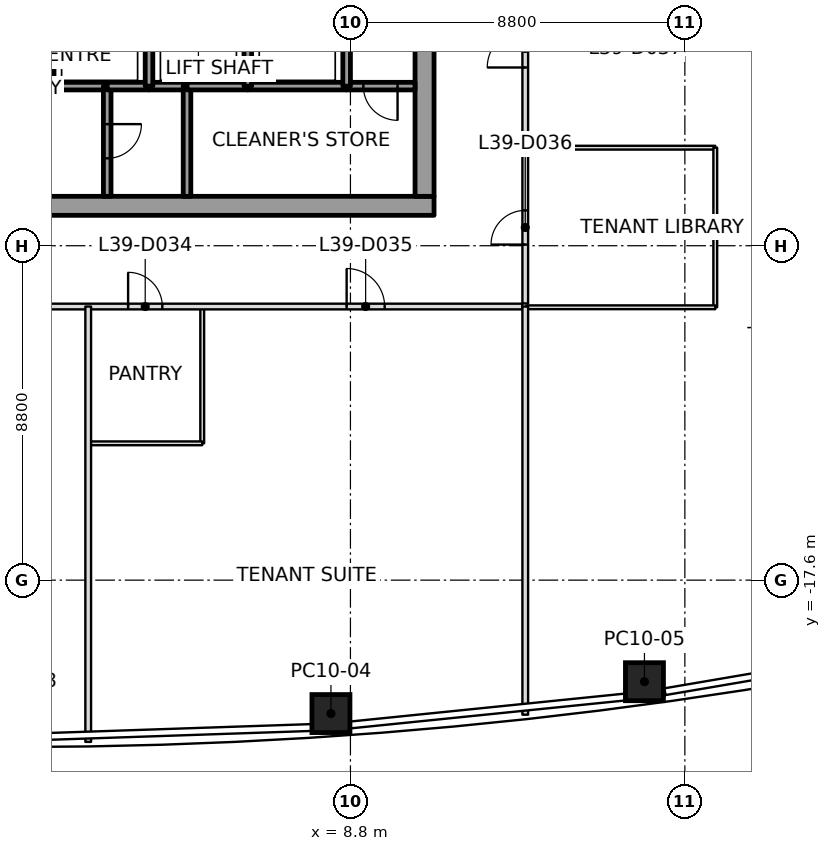
"""IFC4 building model, lengths in metres.
Left out: names, types, materials, properties, quantities, classifications, styles, units other than length and angle.
Written with IfcOpenShell. Run it as: python <this file> out.ifc"""

import sys

from ifc_helpers import new_model, si_unit, direction, frame, frame_2d, origin, origin_2d, place, context, subcontext, project, spatial, rectangle, extrude, element, fill, save


model = new_model("IFC4")
c1 = context("Model", 3, precision=1e-05, world=origin(), true_north=direction((0.0, 1.0)))
c2 = subcontext(c1, "Body", "Model", "MODEL_VIEW")
j1 = project(units=[si_unit("LENGTHUNIT", "METRE"), si_unit("PLANEANGLEUNIT", "RADIAN")], contexts=[c1])
p1 = place(None, origin())
s1 = spatial("IfcSite", under=j1, at=p1, CompositionType="ELEMENT")
p2 = place(p1, origin())
s2 = spatial("IfcBuilding", under=s1, at=p2, CompositionType="ELEMENT")
p3 = place(p2, frame((0.0, 0.0, 177.8)))
s3 = spatial("IfcBuildingStorey", under=s2, at=p3, CompositionType="ELEMENT", Elevation=177.8)
p4 = place(p3, frame((8.287, -21.111, 0.0), z_axis=(-0.008849199152, 0.01116829962, 0.999898475225), x_axis=(0.99768068915, 0.067587294423, 0.008074659732)))
e1 = element("IfcColumn", 1, at=p4, inside=s3, PredefinedType="COLUMN", context=c2, shape_type="SweptSolid", body=[
    extrude(rectangle(XDim=1.0, YDim=1.0, at=origin_2d()), origin(), (0.0, 0.0, 1.0), 4.0),
])
p5 = place(p3, frame((16.536, -20.273, 0.0), z_axis=(-0.017635456472, 0.010434820265, 0.999790030557), x_axis=(0.990735318315, 0.134853029404, 0.016068276304)))
e2 = element("IfcColumn", 2, at=p5, inside=s3, PredefinedType="COLUMN", context=c2, shape_type="SweptSolid", body=[
    extrude(rectangle(XDim=1.0, YDim=1.0, at=origin_2d()), origin(), (0.0, 0.0, 1.0), 4.001),
])
p6 = place(p3, frame((-11.0, -7.75, 0.0), z_axis=(0.0, 0.0, 1.0), x_axis=(1.0, 0.0, 0.0)))
e3 = element("IfcWall", 3, at=p6, inside=s3, PredefinedType="SHEAR", context=c2, shape_type="SweptSolid", body=[
    extrude(rectangle(XDim=22.0, YDim=0.5, at=frame_2d((11.0, 0.0))), origin(), (0.0, 0.0, 1.0), 4.0),
])
p7 = place(p6, frame((10.45, 0.0, 0.0)))
e4 = element("IfcOpeningElement", 4, at=p7, cuts=e3, PredefinedType="OPENING", context=c2, shape_type="SweptSolid", body=[
    extrude(rectangle(XDim=1.1, YDim=2.1, at=frame_2d((0.55, 1.05))), frame((0.0, 0.25, 0.0), z_axis=(0.0, -1.0, 0.0), x_axis=(1.0, 0.0, 0.0)), (0.0, 0.0, 1.0), 0.5),
])
p8 = place(p3, frame((10.75, -7.5, 0.0), z_axis=(0.0, 0.0, 1.0), x_axis=(0.0, 1.0, 0.0)))
e5 = element("IfcWall", 5, at=p8, inside=s3, PredefinedType="SHEAR", context=c2, shape_type="SweptSolid", body=[
    extrude(rectangle(XDim=15.0, YDim=0.5, at=frame_2d((7.5, 0.0))), origin(), (0.0, 0.0, 1.0), 4.0),
])
p9 = place(p8, frame((6.6, 0.0, 0.0)))
e6 = element("IfcOpeningElement", 6, at=p9, cuts=e5, PredefinedType="OPENING", context=c2, shape_type="SweptSolid", body=[
    extrude(rectangle(XDim=1.8, YDim=2.1, at=frame_2d((0.9, 1.05))), frame((0.0, 0.25, 0.0), z_axis=(0.0, -1.0, 0.0), x_axis=(1.0, 0.0, 0.0)), (0.0, 0.0, 1.0), 0.5),
])
p10 = place(p3, frame((0.9, -1.8, 0.0), z_axis=(0.0, 0.0, 1.0), x_axis=(0.0, -1.0, 0.0)))
e7 = element("IfcWall", 7, at=p10, inside=s3, PredefinedType="SOLIDWALL", context=c2, shape_type="SweptSolid", body=[
    extrude(rectangle(XDim=2.8, YDim=0.2, at=frame_2d((1.4, 0.0))), origin(), (0.0, 0.0, 1.0), 3.85),
])
p11 = place(p3, frame((0.9, -4.6, 0.0), z_axis=(0.0, 0.0, 1.0), x_axis=(1.0, 0.0, 0.0)))
e8 = element("IfcWall", 8, at=p11, inside=s3, PredefinedType="SOLIDWALL", context=c2, shape_type="SweptSolid", body=[
    extrude(rectangle(XDim=1.5, YDim=0.2, at=frame_2d((0.75, 0.0))), origin(), (0.0, 0.0, 1.0), 3.85),
])
p12 = place(p3, frame((2.4, -4.6, 0.0), z_axis=(0.0, 0.0, 1.0), x_axis=(0.0, -1.0, 0.0)))
e9 = element("IfcWall", 9, at=p12, inside=s3, PredefinedType="SOLIDWALL", context=c2, shape_type="SweptSolid", body=[
    extrude(rectangle(XDim=2.9, YDim=0.2, at=frame_2d((1.45, 0.0))), origin(), (0.0, 0.0, 1.0), 3.85),
])
p13 = place(p12, frame((1.0, 0.0, 0.0)))
e10 = element("IfcOpeningElement", 10, at=p13, cuts=e9, PredefinedType="OPENING", context=c2, shape_type="SweptSolid", body=[
    extrude(rectangle(XDim=0.9, YDim=2.1, at=frame_2d((0.45, 1.05))), frame((0.0, 0.1, 0.0), z_axis=(0.0, -1.0, 0.0), x_axis=(1.0, 0.0, 0.0)), (0.0, 0.0, 1.0), 0.2),
])
p14 = place(p3, frame((3.5, -4.6, 0.0), z_axis=(0.0, 0.0, 1.0), x_axis=(-1.0, 0.0, 0.0)))
e11 = element("IfcWall", 11, at=p14, inside=s3, PredefinedType="SOLIDWALL", context=c2, shape_type="SweptSolid", body=[
    extrude(rectangle(XDim=1.1, YDim=0.2, at=frame_2d((0.55, 0.0))), origin(), (0.0, 0.0, 1.0), 3.85),
])
p15 = place(p3, frame((4.5, -4.6, 0.0), z_axis=(0.0, 0.0, 1.0), x_axis=(-1.0, 0.0, 0.0)))
e12 = element("IfcWall", 12, at=p15, inside=s3, PredefinedType="SOLIDWALL", context=c2, shape_type="SweptSolid", body=[
    extrude(rectangle(XDim=1.0, YDim=0.2, at=frame_2d((0.5, 0.0))), origin(), (0.0, 0.0, 1.0), 3.85),
])
p16 = place(p3, frame((3.5, -4.6, 0.0), z_axis=(0.0, 0.0, 1.0), x_axis=(0.0, 1.0, 0.0)))
e13 = element("IfcWall", 13, at=p16, inside=s3, PredefinedType="SOLIDWALL", context=c2, shape_type="SweptSolid", body=[
    extrude(rectangle(XDim=2.8, YDim=0.2, at=frame_2d((1.4, 0.0))), origin(), (0.0, 0.0, 1.0), 3.85),
])
p17 = place(p3, frame((4.5, -4.6, 0.0), z_axis=(0.0, 0.0, 1.0), x_axis=(0.0, -1.0, 0.0)))
e14 = element("IfcWall", 14, at=p17, inside=s3, PredefinedType="SOLIDWALL", context=c2, shape_type="SweptSolid", body=[
    extrude(rectangle(XDim=2.9, YDim=0.2, at=frame_2d((1.45, 0.0))), origin(), (0.0, 0.0, 1.0), 3.85),
])
p18 = place(p3, frame((6.1, -4.6, 0.0), z_axis=(0.0, 0.0, 1.0), x_axis=(-1.0, 0.0, 0.0)))
e15 = element("IfcWall", 15, at=p18, inside=s3, PredefinedType="SOLIDWALL", context=c2, shape_type="SweptSolid", body=[
    extrude(rectangle(XDim=1.6, YDim=0.2, at=frame_2d((0.8, 0.0))), origin(), (0.0, 0.0, 1.0), 3.85),
])
p19 = place(p3, frame((8.7, -4.6, 0.0), z_axis=(0.0, 0.0, 1.0), x_axis=(-1.0, 0.0, 0.0)))
e16 = element("IfcWall", 16, at=p19, inside=s3, PredefinedType="SOLIDWALL", context=c2, shape_type="SweptSolid", body=[
    extrude(rectangle(XDim=2.6, YDim=0.2, at=frame_2d((1.3, 0.0))), origin(), (0.0, 0.0, 1.0), 3.85),
])
p20 = place(p3, frame((6.1, -4.6, 0.0), z_axis=(0.0, 0.0, 1.0), x_axis=(0.0, 1.0, 0.0)))
e17 = element("IfcWall", 17, at=p20, inside=s3, PredefinedType="SOLIDWALL", context=c2, shape_type="SweptSolid", body=[
    extrude(rectangle(XDim=2.8, YDim=0.2, at=frame_2d((1.4, 0.0))), origin(), (0.0, 0.0, 1.0), 3.85),
])
p21 = place(p3, frame((10.5, -4.6, 0.0), z_axis=(0.0, 0.0, 1.0), x_axis=(-1.0, 0.0, 0.0)))
e18 = element("IfcWall", 18, at=p21, inside=s3, PredefinedType="SOLIDWALL", context=c2, shape_type="SweptSolid", body=[
    extrude(rectangle(XDim=1.8, YDim=0.2, at=frame_2d((0.9, 0.0))), origin(), (0.0, 0.0, 1.0), 3.85),
])
p22 = place(p21, frame((0.46, 0.0, 0.0)))
e19 = element("IfcOpeningElement", 19, at=p22, cuts=e18, PredefinedType="OPENING", context=c2, shape_type="SweptSolid", body=[
    extrude(rectangle(XDim=0.9, YDim=2.1, at=frame_2d((0.45, 1.05))), frame((0.0, 0.1, 0.0), z_axis=(0.0, -1.0, 0.0), x_axis=(1.0, 0.0, 0.0)), (0.0, 0.0, 1.0), 0.2),
])
p23 = place(p3, frame((8.7, -1.8, 0.0), z_axis=(0.0, 0.0, 1.0), x_axis=(0.0, -1.0, 0.0)))
e20 = element("IfcWall", 20, at=p23, inside=s3, PredefinedType="SOLIDWALL", context=c2, shape_type="SweptSolid", body=[
    extrude(rectangle(XDim=2.8, YDim=0.2, at=frame_2d((1.4, 0.0))), origin(), (0.0, 0.0, 1.0), 3.85),
])
p24 = place(p3, frame((1.9, -10.4, 0.0), z_axis=(0.0, 0.0, 1.0), x_axis=(0.0, -1.0, 0.0)))
e21 = element("IfcWall", 21, at=p24, inside=s3, PredefinedType="PARTITIONING", context=c2, shape_type="SweptSolid", body=[
    extrude(rectangle(XDim=11.457, YDim=0.15, at=frame_2d((5.729, 0.0))), origin(), (0.0, 0.0, 1.0), 3.234),
])
p25 = place(p3, frame((13.4, -10.4, 0.0), z_axis=(0.0, 0.0, 1.0), x_axis=(0.0, -1.0, 0.0)))
e22 = element("IfcWall", 22, at=p25, inside=s3, PredefinedType="PARTITIONING", context=c2, shape_type="SweptSolid", body=[
    extrude(rectangle(XDim=10.741, YDim=0.15, at=frame_2d((5.37, 0.0))), origin(), (0.0, 0.0, 1.0), 3.234),
])
p26 = place(p3, frame((-13.32, -10.4, 0.0), z_axis=(0.0, 0.0, 1.0), x_axis=(1.0, 0.0, 0.0)))
e23 = element("IfcWall", 23, at=p26, inside=s3, PredefinedType="PARTITIONING", context=c2, shape_type="SweptSolid", body=[
    extrude(rectangle(XDim=26.64, YDim=0.15, at=frame_2d((13.32, 0.0))), origin(), (0.0, 0.0, 1.0), 3.317),
])
p27 = place(p26, frame((0.97, 0.0, 0.0)))
e24 = element("IfcOpeningElement", 24, at=p27, cuts=e23, PredefinedType="OPENING", context=c2, shape_type="SweptSolid", body=[
    extrude(rectangle(XDim=0.9, YDim=2.1, at=frame_2d((0.45, 1.05))), frame((0.0, 0.075, 0.0), z_axis=(0.0, -1.0, 0.0), x_axis=(1.0, 0.0, 0.0)), (0.0, 0.0, 1.0), 0.15),
])
p28 = place(p26, frame((8.62, 0.0, 0.0)))
e25 = element("IfcOpeningElement", 25, at=p28, cuts=e23, PredefinedType="OPENING", context=c2, shape_type="SweptSolid", body=[
    extrude(rectangle(XDim=1.0, YDim=2.1, at=frame_2d((0.5, 1.05))), frame((0.0, 0.075, 0.0), z_axis=(0.0, -1.0, 0.0), x_axis=(1.0, 0.0, 0.0)), (0.0, 0.0, 1.0), 0.15),
])
p29 = place(p26, frame((16.27, 0.0, 0.0)))
e26 = element("IfcOpeningElement", 26, at=p29, cuts=e23, PredefinedType="OPENING", context=c2, shape_type="SweptSolid", body=[
    extrude(rectangle(XDim=0.9, YDim=2.1, at=frame_2d((0.45, 1.05))), frame((0.0, 0.075, 0.0), z_axis=(0.0, -1.0, 0.0), x_axis=(1.0, 0.0, 0.0)), (0.0, 0.0, 1.0), 0.15),
])
p30 = place(p26, frame((22.02, 0.0, 0.0)))
e27 = element("IfcOpeningElement", 27, at=p30, cuts=e23, PredefinedType="OPENING", context=c2, shape_type="SweptSolid", body=[
    extrude(rectangle(XDim=1.0, YDim=2.1, at=frame_2d((0.5, 1.05))), frame((0.0, 0.075, 0.0), z_axis=(0.0, -1.0, 0.0), x_axis=(1.0, 0.0, 0.0)), (0.0, 0.0, 1.0), 0.15),
])
p31 = place(p3, frame((13.4, -10.32, 0.0), z_axis=(0.0, 0.0, 1.0), x_axis=(0.0, 1.0, 0.0)))
e28 = element("IfcWall", 28, at=p31, inside=s3, PredefinedType="PARTITIONING", context=c2, shape_type="SweptSolid", body=[
    extrude(rectangle(XDim=20.64, YDim=0.15, at=frame_2d((10.32, 0.0))), origin(), (0.0, 0.0, 1.0), 3.166),
])
p32 = place(p31, frame((10.57, 0.0, 0.0)))
e29 = element("IfcOpeningElement", 29, at=p32, cuts=e28, PredefinedType="OPENING", context=c2, shape_type="SweptSolid", body=[
    extrude(rectangle(XDim=0.9, YDim=2.1, at=frame_2d((0.45, 1.05))), frame((0.0, 0.075, 0.0), z_axis=(0.0, -1.0, 0.0), x_axis=(1.0, 0.0, 0.0)), (0.0, 0.0, 1.0), 0.15),
])
p33 = place(p31, frame((16.32, 0.0, 0.0)))
e30 = element("IfcOpeningElement", 30, at=p33, cuts=e28, PredefinedType="OPENING", context=c2, shape_type="SweptSolid", body=[
    extrude(rectangle(XDim=1.0, YDim=2.1, at=frame_2d((0.5, 1.05))), frame((0.0, 0.075, 0.0), z_axis=(0.0, -1.0, 0.0), x_axis=(1.0, 0.0, 0.0)), (0.0, 0.0, 1.0), 0.15),
])
p34 = place(p31, frame((1.55, 0.0, 0.0)))
e31 = element("IfcOpeningElement", 31, at=p34, cuts=e28, PredefinedType="OPENING", context=c2, shape_type="SweptSolid", body=[
    extrude(rectangle(XDim=0.9, YDim=2.1, at=frame_2d((0.45, 1.05))), frame((0.0, 0.075, 0.0), z_axis=(0.0, -1.0, 0.0), x_axis=(1.0, 0.0, 0.0)), (0.0, 0.0, 1.0), 0.15),
])
p35 = place(p31, frame((6.21, 0.0, 0.0)))
e32 = element("IfcOpeningElement", 32, at=p35, cuts=e28, PredefinedType="OPENING", context=c2, shape_type="SweptSolid", body=[
    extrude(rectangle(XDim=1.0, YDim=2.1, at=frame_2d((0.5, 1.05))), frame((0.0, 0.075, 0.0), z_axis=(0.0, -1.0, 0.0), x_axis=(1.0, 0.0, 0.0)), (0.0, 0.0, 1.0), 0.15),
])
p36 = place(p3, frame((4.9, -10.43, 0.0), z_axis=(0.0, 0.0, 1.0), x_axis=(0.0, -1.0, 0.0)))
e33 = element("IfcWall", 33, at=p36, inside=s3, PredefinedType="PARTITIONING", context=c2, shape_type="SweptSolid", body=[
    extrude(rectangle(XDim=3.57, YDim=0.1, at=frame_2d((1.785, 0.0))), origin(), (0.0, 0.0, 1.0), 3.45),
])
p37 = place(p3, frame((4.9, -14.0, 0.0), z_axis=(0.0, 0.0, 1.0), x_axis=(-1.0, 0.0, 0.0)))
e34 = element("IfcWall", 34, at=p37, inside=s3, PredefinedType="PARTITIONING", context=c2, shape_type="SweptSolid", body=[
    extrude(rectangle(XDim=2.97, YDim=0.1, at=frame_2d((1.485, 0.0))), origin(), (0.0, 0.0, 1.0), 3.317),
])
p38 = place(p3, frame((13.43, -6.22, 0.0), z_axis=(0.0, 0.0, 1.0), x_axis=(1.0, 0.0, 0.0)))
e35 = element("IfcWall", 35, at=p38, inside=s3, PredefinedType="PARTITIONING", context=c2, shape_type="SweptSolid", body=[
    extrude(rectangle(XDim=4.97, YDim=0.1, at=frame_2d((2.485, 0.0))), origin(), (0.0, 0.0, 1.0), 3.247),
])
p39 = place(p3, frame((18.4, -6.22, 0.0), z_axis=(0.0, 0.0, 1.0), x_axis=(0.0, -1.0, 0.0)))
e36 = element("IfcWall", 36, at=p39, inside=s3, PredefinedType="PARTITIONING", context=c2, shape_type="SweptSolid", body=[
    extrude(rectangle(XDim=4.2, YDim=0.1, at=frame_2d((2.1, 0.0))), origin(), (0.0, 0.0, 1.0), 3.45),
])
p40 = place(p3, frame((18.4, -10.42, 0.0), z_axis=(0.0, 0.0, 1.0), x_axis=(-1.0, 0.0, 0.0)))
e37 = element("IfcWall", 37, at=p40, inside=s3, PredefinedType="PARTITIONING", context=c2, shape_type="SweptSolid", body=[
    extrude(rectangle(XDim=4.97, YDim=0.1, at=frame_2d((2.485, 0.0))), origin(), (0.0, 0.0, 1.0), 3.166),
])
p41 = place(p29, origin())
e38 = element("IfcDoor", 38, at=p41, inside=s3, OperationType="SINGLE_SWING_LEFT", PredefinedType="DOOR", context=c2, shape_type="SweptSolid", body=[
    extrude(rectangle(XDim=0.9, YDim=2.1, at=frame_2d((0.45, 1.05))), frame((0.0, 0.025, 0.0), z_axis=(0.0, -1.0, 0.0), x_axis=(1.0, 0.0, 0.0)), (0.0, 0.0, 1.0), 0.05),
])
fill(e26, e38)
p42 = place(p30, origin())
e39 = element("IfcDoor", 39, at=p42, inside=s3, OperationType="SINGLE_SWING_LEFT", PredefinedType="DOOR", context=c2, shape_type="SweptSolid", body=[
    extrude(rectangle(XDim=1.0, YDim=2.1, at=frame_2d((0.5, 1.05))), frame((0.0, 0.025, 0.0), z_axis=(0.0, -1.0, 0.0), x_axis=(1.0, 0.0, 0.0)), (0.0, 0.0, 1.0), 0.05),
])
fill(e27, e39)
p43 = place(p34, origin())
e40 = element("IfcDoor", 40, at=p43, inside=s3, OperationType="SINGLE_SWING_RIGHT", PredefinedType="DOOR", context=c2, shape_type="SweptSolid", body=[
    extrude(rectangle(XDim=0.9, YDim=2.1, at=frame_2d((0.45, 1.05))), frame((0.0, 0.025, 0.0), z_axis=(0.0, -1.0, 0.0), x_axis=(1.0, 0.0, 0.0)), (0.0, 0.0, 1.0), 0.05),
])
fill(e31, e40)
p44 = place(p35, origin())
e41 = element("IfcDoor", 41, at=p44, inside=s3, OperationType="SINGLE_SWING_RIGHT", PredefinedType="DOOR", context=c2, shape_type="SweptSolid", body=[
    extrude(rectangle(XDim=1.0, YDim=2.1, at=frame_2d((0.5, 1.05))), frame((0.0, 0.025, 0.0), z_axis=(0.0, -1.0, 0.0), x_axis=(1.0, 0.0, 0.0)), (0.0, 0.0, 1.0), 0.05),
])
fill(e32, e41)
p45 = place(p22, origin())
e42 = element("IfcDoor", 42, at=p45, inside=s3, OperationType="SINGLE_SWING_LEFT", PredefinedType="DOOR", context=c2, shape_type="SweptSolid", body=[
    extrude(rectangle(XDim=0.9, YDim=2.1, at=frame_2d((0.45, 1.05))), frame((0.0, 0.025, 0.0), z_axis=(0.0, -1.0, 0.0), x_axis=(1.0, 0.0, 0.0)), (0.0, 0.0, 1.0), 0.05),
])
fill(e19, e42)
p46 = place(p13, origin())
e43 = element("IfcDoor", 43, at=p46, inside=s3, OperationType="SINGLE_SWING_LEFT", PredefinedType="DOOR", context=c2, shape_type="SweptSolid", body=[
    extrude(rectangle(XDim=0.9, YDim=2.1, at=frame_2d((0.45, 1.05))), frame((0.0, 0.025, 0.0), z_axis=(0.0, -1.0, 0.0), x_axis=(1.0, 0.0, 0.0)), (0.0, 0.0, 1.0), 0.05),
])
fill(e10, e43)
save(model, sys.argv[1])
